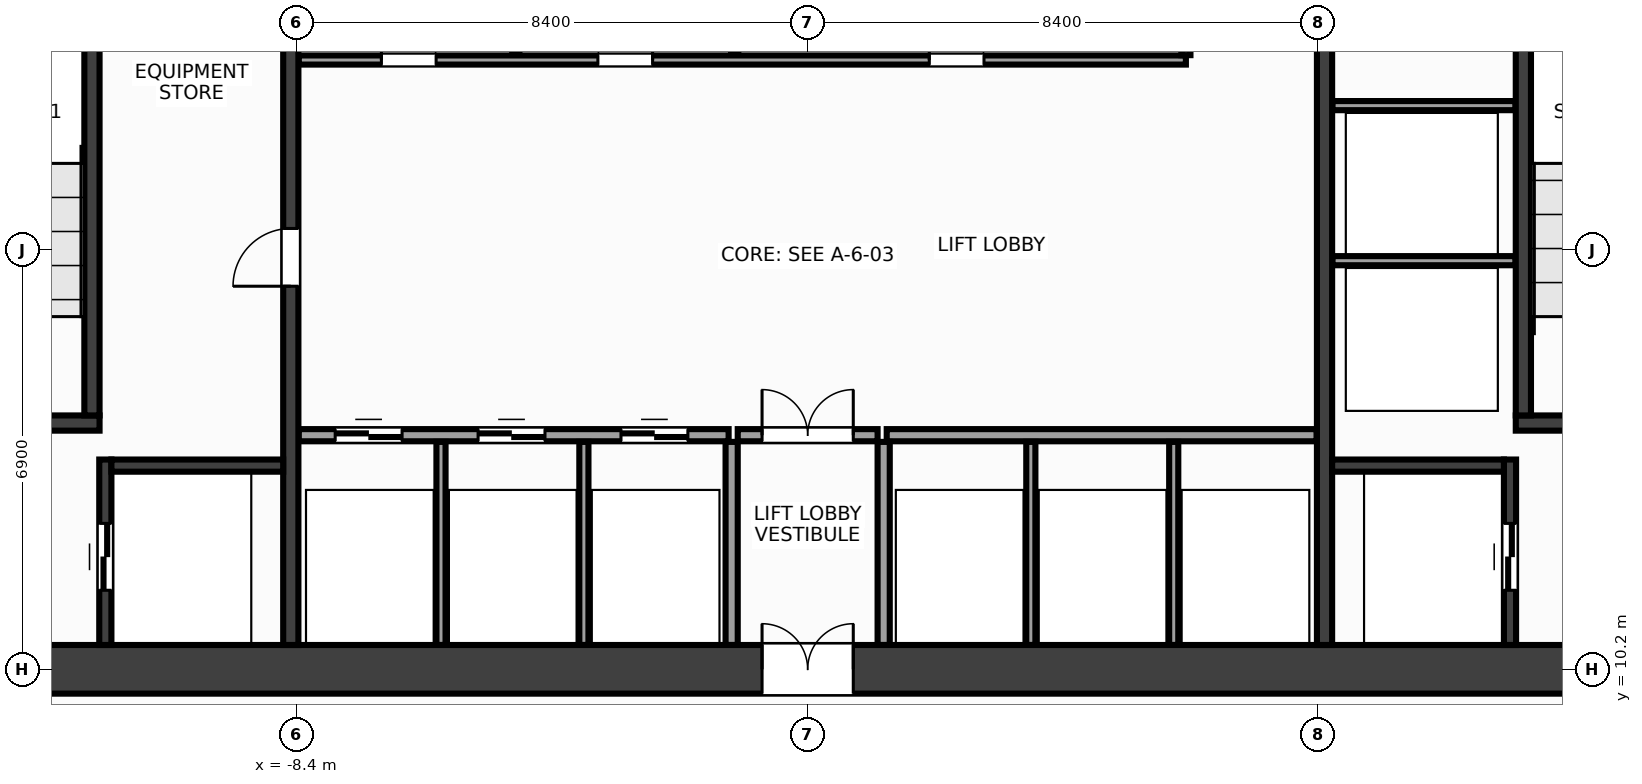
"""IFC4 building model, lengths in metres.
Left out: names, types, materials, properties, quantities, classifications, styles, units other than length and angle.
Written with IfcOpenShell. Run it as: python <this file> out.ifc"""

import sys

from ifc_helpers import new_model, si_unit, direction, frame, frame_2d, origin, place, context, subcontext, project, spatial, rectangle, extrude, source, transform, mapped, element, fill, save


model = new_model("IFC4")
c1 = context("Model", 3, precision=1e-05, world=origin(), true_north=direction((0.0, 1.0)))
c2 = subcontext(c1, "Body", "Model", "MODEL_VIEW")
j1 = project(units=[si_unit("LENGTHUNIT", "METRE"), si_unit("PLANEANGLEUNIT", "RADIAN")], contexts=[c1])
p1 = place(None, origin())
s1 = spatial("IfcSite", under=j1, at=p1, CompositionType="ELEMENT")
p2 = place(p1, origin())
s2 = spatial("IfcBuilding", under=s1, at=p2, CompositionType="ELEMENT")
p3 = place(p2, frame((0.0, 0.0, 30.8)))
s3 = spatial("IfcBuildingStorey", under=s2, at=p3, CompositionType="ELEMENT", Elevation=30.8)
m1 = source(origin(), c2, "Body", "SweptSolid", [
    extrude(rectangle(XDim=32.0, YDim=0.8, at=frame_2d((16.0, 0.0))), origin(), (0.0, 0.0, 1.0), 3.6),
])
p4 = place(p3, frame((-16.0, 10.2, 0.0), z_axis=(0.0, 0.0, 1.0), x_axis=(1.0, 0.0, 0.0)))
e1 = element("IfcWall", 1, at=p4, inside=s3, PredefinedType="SHEAR", context=c2, shape_type="MappedRepresentation", body=[
    mapped(m1, transform((0.0, 0.0, 0.0), x_axis=(1.0, 0.0, 0.0), y_axis=(0.0, 1.0, 0.0), z_axis=(0.0, 0.0, 1.0), scale=1.0)),
])
p5 = place(p4, frame((1.85, 0.0, 0.0)))
e2 = element("IfcOpeningElement", 2, at=p5, cuts=e1, PredefinedType="OPENING", context=c2, shape_type="SweptSolid", body=[
    extrude(rectangle(XDim=1.6, YDim=2.15, at=frame_2d((0.8, 1.075))), frame((0.0, 0.412, 0.0), z_axis=(0.0, -1.0, 0.0), x_axis=(1.0, 0.0, 0.0)), (0.0, 0.0, 1.0), 0.824),
])
p6 = place(p4, frame((28.55, 0.0, 0.0)))
e3 = element("IfcOpeningElement", 3, at=p6, cuts=e1, PredefinedType="OPENING", context=c2, shape_type="SweptSolid", body=[
    extrude(rectangle(XDim=1.6, YDim=2.15, at=frame_2d((0.8, 1.075))), frame((0.0, 0.412, 0.0), z_axis=(0.0, -1.0, 0.0), x_axis=(1.0, 0.0, 0.0)), (0.0, 0.0, 1.0), 0.824),
])
p7 = place(p4, frame((15.25, 0.0, 0.0)))
e4 = element("IfcOpeningElement", 4, at=p7, cuts=e1, PredefinedType="OPENING", context=c2, shape_type="SweptSolid", body=[
    extrude(rectangle(XDim=1.5, YDim=2.2, at=frame_2d((0.75, 1.1))), frame((0.0, 0.412, 0.0), z_axis=(0.0, -1.0, 0.0), x_axis=(1.0, 0.0, 0.0)), (0.0, 0.0, 1.0), 0.824),
])
m2 = source(origin(), c2, "Body", "SweptSolid", [
    extrude(rectangle(XDim=12.8, YDim=0.25, at=frame_2d((6.4, 0.0))), origin(), (0.0, 0.0, 1.0), 3.6),
])
p8 = place(p3, frame((-8.5, 10.6, 0.0), z_axis=(0.0, 0.0, 1.0), x_axis=(0.0, 1.0, 0.0)))
e5 = element("IfcWall", 5, at=p8, inside=s3, PredefinedType="SHEAR", context=c2, shape_type="MappedRepresentation", body=[
    mapped(m2, transform((0.0, 0.0, 0.0), x_axis=(1.0, 0.0, 0.0), y_axis=(0.0, 1.0, 0.0), z_axis=(0.0, 0.0, 1.0), scale=1.0)),
])
p9 = place(p8, frame((5.9, 0.0, 0.0)))
e6 = element("IfcOpeningElement", 6, at=p9, cuts=e5, PredefinedType="OPENING", context=c2, shape_type="SweptSolid", body=[
    extrude(rectangle(XDim=0.95, YDim=2.15, at=frame_2d((0.475, 1.075))), frame((0.0, 0.137, 0.0), z_axis=(0.0, -1.0, 0.0), x_axis=(1.0, 0.0, 0.0)), (0.0, 0.0, 1.0), 0.274),
])
p10 = place(p3, frame((8.5, 10.6, 0.0), z_axis=(0.0, 0.0, 1.0), x_axis=(0.0, 1.0, 0.0)))
e7 = element("IfcWall", 7, at=p10, inside=s3, PredefinedType="SHEAR", context=c2, shape_type="MappedRepresentation", body=[
    mapped(m2, transform((0.0, 0.0, 0.0), x_axis=(1.0, 0.0, 0.0), y_axis=(0.0, 1.0, 0.0), z_axis=(0.0, 0.0, 1.0), scale=1.0)),
])
p11 = place(p10, frame((9.85, 0.0, 0.0)))
e8 = element("IfcOpeningElement", 8, at=p11, cuts=e7, PredefinedType="OPENING", context=c2, shape_type="SweptSolid", body=[
    extrude(rectangle(XDim=0.95, YDim=2.15, at=frame_2d((0.475, 1.075))), frame((0.0, 0.137, 0.0), z_axis=(0.0, -1.0, 0.0), x_axis=(1.0, 0.0, 0.0)), (0.0, 0.0, 1.0), 0.274),
])
m3 = source(origin(), c2, "Body", "SweptSolid", [
    extrude(rectangle(XDim=3.555, YDim=0.25, at=frame_2d((1.777, 0.0))), origin(), (0.0, 0.0, 1.0), 3.6),
])
p12 = place(p3, frame((-15.2, 14.25, 0.0), z_axis=(0.0, 0.0, 1.0), x_axis=(1.0, 0.0, 0.0)))
e9 = element("IfcWall", 9, at=p12, inside=s3, PredefinedType="SHEAR", context=c2, shape_type="MappedRepresentation", body=[
    mapped(m3, transform((0.0, 0.0, 0.0), x_axis=(1.0, 0.0, 0.0), y_axis=(0.0, 1.0, 0.0), z_axis=(0.0, 0.0, 1.0), scale=1.0)),
])
p13 = place(p12, frame((0.95, 0.0, 0.0)))
e10 = element("IfcOpeningElement", 10, at=p13, cuts=e9, PredefinedType="OPENING", context=c2, shape_type="SweptSolid", body=[
    extrude(rectangle(XDim=1.6, YDim=2.15, at=frame_2d((0.8, 1.075))), frame((0.0, 0.137, 0.0), z_axis=(0.0, -1.0, 0.0), x_axis=(1.0, 0.0, 0.0)), (0.0, 0.0, 1.0), 0.274),
])
m4 = source(origin(), c2, "Body", "SweptSolid", [
    extrude(rectangle(XDim=9.025, YDim=0.25, at=frame_2d((4.512, 0.0))), origin(), (0.0, 0.0, 1.0), 3.6),
])
p14 = place(p3, frame((-11.77, 14.375, 0.0), z_axis=(0.0, 0.0, 1.0), x_axis=(0.0, 1.0, 0.0)))
e11 = element("IfcWall", 11, at=p14, inside=s3, PredefinedType="SHEAR", context=c2, shape_type="MappedRepresentation", body=[
    mapped(m4, transform((0.0, 0.0, 0.0), x_axis=(1.0, 0.0, 0.0), y_axis=(0.0, 1.0, 0.0), z_axis=(0.0, 0.0, 1.0), scale=1.0)),
])
p15 = place(p3, frame((11.645, 14.25, 0.0), z_axis=(0.0, 0.0, 1.0), x_axis=(1.0, 0.0, 0.0)))
e12 = element("IfcWall", 12, at=p15, inside=s3, PredefinedType="SHEAR", context=c2, shape_type="MappedRepresentation", body=[
    mapped(m3, transform((0.0, 0.0, 0.0), x_axis=(1.0, 0.0, 0.0), y_axis=(0.0, 1.0, 0.0), z_axis=(0.0, 0.0, 1.0), scale=1.0)),
])
p16 = place(p15, frame((0.95, 0.0, 0.0)))
e13 = element("IfcOpeningElement", 13, at=p16, cuts=e12, PredefinedType="OPENING", context=c2, shape_type="SweptSolid", body=[
    extrude(rectangle(XDim=1.6, YDim=2.15, at=frame_2d((0.8, 1.075))), frame((0.0, 0.137, 0.0), z_axis=(0.0, -1.0, 0.0), x_axis=(1.0, 0.0, 0.0)), (0.0, 0.0, 1.0), 0.274),
])
p17 = place(p3, frame((11.77, 14.375, 0.0), z_axis=(0.0, 0.0, 1.0), x_axis=(0.0, 1.0, 0.0)))
e14 = element("IfcWall", 14, at=p17, inside=s3, PredefinedType="SHEAR", context=c2, shape_type="MappedRepresentation", body=[
    mapped(m4, transform((0.0, 0.0, 0.0), x_axis=(1.0, 0.0, 0.0), y_axis=(0.0, 1.0, 0.0), z_axis=(0.0, 0.0, 1.0), scale=1.0)),
])
m5 = source(origin(), c2, "Body", "SweptSolid", [
    extrude(rectangle(XDim=3.05, YDim=0.2, at=frame_2d((1.525, 0.0))), origin(), (0.0, 0.0, 1.0), 3.6),
])
p18 = place(p3, frame((-11.55, 10.6, 0.0), z_axis=(0.0, 0.0, 1.0), x_axis=(0.0, 1.0, 0.0)))
e15 = element("IfcWall", 15, at=p18, inside=s3, PredefinedType="SHEAR", context=c2, shape_type="MappedRepresentation", body=[
    mapped(m5, transform((0.0, 0.0, 0.0), x_axis=(1.0, 0.0, 0.0), y_axis=(0.0, 1.0, 0.0), z_axis=(0.0, 0.0, 1.0), scale=1.0)),
])
p19 = place(p18, frame((0.9, 0.0, 0.0)))
e16 = element("IfcOpeningElement", 16, at=p19, cuts=e15, PredefinedType="OPENING", context=c2, shape_type="SweptSolid", body=[
    extrude(rectangle(XDim=1.1, YDim=2.15, at=frame_2d((0.55, 1.075))), frame((0.0, 0.112, 0.0), z_axis=(0.0, -1.0, 0.0), x_axis=(1.0, 0.0, 0.0)), (0.0, 0.0, 1.0), 0.224),
])
m6 = source(origin(), c2, "Body", "SweptSolid", [
    extrude(rectangle(XDim=2.825, YDim=0.2, at=frame_2d((1.413, 0.0))), origin(), (0.0, 0.0, 1.0), 3.6),
])
p20 = place(p3, frame((-11.45, 13.55, 0.0), z_axis=(0.0, 0.0, 1.0), x_axis=(1.0, 0.0, 0.0)))
e17 = element("IfcWall", 17, at=p20, inside=s3, PredefinedType="SHEAR", context=c2, shape_type="MappedRepresentation", body=[
    mapped(m6, transform((0.0, 0.0, 0.0), x_axis=(1.0, 0.0, 0.0), y_axis=(0.0, 1.0, 0.0), z_axis=(0.0, 0.0, 1.0), scale=1.0)),
])
p21 = place(p3, frame((11.55, 10.6, 0.0), z_axis=(0.0, 0.0, 1.0), x_axis=(0.0, 1.0, 0.0)))
e18 = element("IfcWall", 18, at=p21, inside=s3, PredefinedType="SHEAR", context=c2, shape_type="MappedRepresentation", body=[
    mapped(m5, transform((0.0, 0.0, 0.0), x_axis=(1.0, 0.0, 0.0), y_axis=(0.0, 1.0, 0.0), z_axis=(0.0, 0.0, 1.0), scale=1.0)),
])
p22 = place(p21, frame((0.9, 0.0, 0.0)))
e19 = element("IfcOpeningElement", 19, at=p22, cuts=e18, PredefinedType="OPENING", context=c2, shape_type="SweptSolid", body=[
    extrude(rectangle(XDim=1.1, YDim=2.15, at=frame_2d((0.55, 1.075))), frame((0.0, 0.112, 0.0), z_axis=(0.0, -1.0, 0.0), x_axis=(1.0, 0.0, 0.0)), (0.0, 0.0, 1.0), 0.224),
])
p23 = place(p3, frame((8.625, 13.55, 0.0), z_axis=(0.0, 0.0, 1.0), x_axis=(1.0, 0.0, 0.0)))
e20 = element("IfcWall", 20, at=p23, inside=s3, PredefinedType="SHEAR", context=c2, shape_type="MappedRepresentation", body=[
    mapped(m6, transform((0.0, 0.0, 0.0), x_axis=(1.0, 0.0, 0.0), y_axis=(0.0, 1.0, 0.0), z_axis=(0.0, 0.0, 1.0), scale=1.0)),
])
m7 = source(origin(), c2, "Body", "SweptSolid", [
    extrude(rectangle(XDim=3.01, YDim=0.15, at=frame_2d((1.505, 0.0))), origin(), (0.0, 0.0, 1.0), 3.36),
])
for number, where, z_axis, x_axis in (
    (21, (8.63, 16.92, 0.0), (0.0, 0.0, 1.0), (1.0, 0.0, 0.0)),
    (22, (8.63, 19.47, 0.0), (0.0, 0.0, 1.0), (1.0, 0.0, 0.0)),
):
    element("IfcWall", number, at=place(p3, frame(where, z_axis=z_axis, x_axis=x_axis)), inside=s3, PredefinedType="PARTITIONING", context=c2, shape_type="MappedRepresentation", body=[
        mapped(m7, transform((0.0, 0.0, 0.0), x_axis=(1.0, 0.0, 0.0), y_axis=(0.0, 1.0, 0.0), z_axis=(0.0, 0.0, 1.0), scale=1.0)),
    ])
m8 = source(origin(), c2, "Body", "SweptSolid", [
    extrude(rectangle(XDim=7.07, YDim=0.2, at=frame_2d((3.535, 0.0))), origin(), (0.0, 0.0, 1.0), 3.36),
])
p24 = place(p3, frame((-8.37, 14.05, 0.0), z_axis=(0.0, 0.0, 1.0), x_axis=(1.0, 0.0, 0.0)))
e23 = element("IfcWall", 23, at=p24, inside=s3, PredefinedType="PARTITIONING", context=c2, shape_type="MappedRepresentation", body=[
    mapped(m8, transform((0.0, 0.0, 0.0), x_axis=(1.0, 0.0, 0.0), y_axis=(0.0, 1.0, 0.0), z_axis=(0.0, 0.0, 1.0), scale=1.0)),
])
p25 = place(p24, frame((0.6, 0.0, 0.0)))
e24 = element("IfcOpeningElement", 24, at=p25, cuts=e23, PredefinedType="OPENING", context=c2, shape_type="SweptSolid", body=[
    extrude(rectangle(XDim=1.1, YDim=2.15, at=frame_2d((0.55, 1.075))), frame((0.0, 0.112, 0.0), z_axis=(0.0, -1.0, 0.0), x_axis=(1.0, 0.0, 0.0)), (0.0, 0.0, 1.0), 0.224),
])
p26 = place(p24, frame((2.95, 0.0, 0.0)))
e25 = element("IfcOpeningElement", 25, at=p26, cuts=e23, PredefinedType="OPENING", context=c2, shape_type="SweptSolid", body=[
    extrude(rectangle(XDim=1.1, YDim=2.15, at=frame_2d((0.55, 1.075))), frame((0.0, 0.112, 0.0), z_axis=(0.0, -1.0, 0.0), x_axis=(1.0, 0.0, 0.0)), (0.0, 0.0, 1.0), 0.224),
])
p27 = place(p24, frame((5.3, 0.0, 0.0)))
e26 = element("IfcOpeningElement", 26, at=p27, cuts=e23, PredefinedType="OPENING", context=c2, shape_type="SweptSolid", body=[
    extrude(rectangle(XDim=1.1, YDim=2.15, at=frame_2d((0.55, 1.075))), frame((0.0, 0.112, 0.0), z_axis=(0.0, -1.0, 0.0), x_axis=(1.0, 0.0, 0.0)), (0.0, 0.0, 1.0), 0.224),
])
p28 = place(p3, frame((1.3, 14.05, 0.0), z_axis=(0.0, 0.0, 1.0), x_axis=(1.0, 0.0, 0.0)))
e27 = element("IfcWall", 27, at=p28, inside=s3, PredefinedType="PARTITIONING", context=c2, shape_type="MappedRepresentation", body=[
    mapped(m8, transform((0.0, 0.0, 0.0), x_axis=(1.0, 0.0, 0.0), y_axis=(0.0, 1.0, 0.0), z_axis=(0.0, 0.0, 1.0), scale=1.0)),
])
m9 = source(origin(), c2, "Body", "SweptSolid", [
    extrude(rectangle(XDim=3.34, YDim=0.2, at=frame_2d((1.67, 0.0))), origin(), (0.0, 0.0, 1.0), 3.36),
])
for number, where, z_axis, x_axis in (
    (28, (-1.25, 10.6, 0.0), (0.0, 0.0, 1.0), (0.0, 1.0, 0.0)),
    (29, (1.25, 10.6, 0.0), (0.0, 0.0, 1.0), (0.0, 1.0, 0.0)),
):
    element("IfcWall", number, at=place(p3, frame(where, z_axis=z_axis, x_axis=x_axis)), inside=s3, PredefinedType="PARTITIONING", context=c2, shape_type="MappedRepresentation", body=[
        mapped(m9, transform((0.0, 0.0, 0.0), x_axis=(1.0, 0.0, 0.0), y_axis=(0.0, 1.0, 0.0), z_axis=(0.0, 0.0, 1.0), scale=1.0)),
    ])
m10 = source(origin(), c2, "Body", "SweptSolid", [
    extrude(rectangle(XDim=2.3, YDim=0.2, at=frame_2d((1.15, 0.0))), origin(), (0.0, 0.0, 1.0), 3.36),
])
p29 = place(p3, frame((-1.15, 14.05, 0.0), z_axis=(0.0, 0.0, 1.0), x_axis=(1.0, 0.0, 0.0)))
e30 = element("IfcWall", 30, at=p29, inside=s3, PredefinedType="PARTITIONING", context=c2, shape_type="MappedRepresentation", body=[
    mapped(m10, transform((0.0, 0.0, 0.0), x_axis=(1.0, 0.0, 0.0), y_axis=(0.0, 1.0, 0.0), z_axis=(0.0, 0.0, 1.0), scale=1.0)),
])
p30 = place(p29, frame((0.4, 0.0, 0.0)))
e31 = element("IfcOpeningElement", 31, at=p30, cuts=e30, PredefinedType="OPENING", context=c2, shape_type="SweptSolid", body=[
    extrude(rectangle(XDim=1.5, YDim=2.2, at=frame_2d((0.75, 1.1))), frame((0.0, 0.112, 0.0), z_axis=(0.0, -1.0, 0.0), x_axis=(1.0, 0.0, 0.0)), (0.0, 0.0, 1.0), 0.224),
])
m11 = source(origin(), c2, "Body", "SweptSolid", [
    extrude(rectangle(XDim=14.59, YDim=0.15, at=frame_2d((7.295, 0.0))), origin(), (0.0, 0.0, 1.0), 3.36),
])
p31 = place(p3, frame((-8.37, 20.22, 0.0), z_axis=(0.0, 0.0, 1.0), x_axis=(1.0, 0.0, 0.0)))
e32 = element("IfcWall", 32, at=p31, inside=s3, PredefinedType="PARTITIONING", context=c2, shape_type="MappedRepresentation", body=[
    mapped(m11, transform((0.0, 0.0, 0.0), x_axis=(1.0, 0.0, 0.0), y_axis=(0.0, 1.0, 0.0), z_axis=(0.0, 0.0, 1.0), scale=1.0)),
])
p32 = place(p31, frame((1.36, 0.0, 0.0)))
e33 = element("IfcOpeningElement", 33, at=p32, cuts=e32, PredefinedType="OPENING", context=c2, shape_type="SweptSolid", body=[
    extrude(rectangle(XDim=0.9, YDim=2.15, at=frame_2d((0.45, 1.075))), frame((0.0, 0.087, 0.0), z_axis=(0.0, -1.0, 0.0), x_axis=(1.0, 0.0, 0.0)), (0.0, 0.0, 1.0), 0.174),
])
p33 = place(p31, frame((4.92, 0.0, 0.0)))
e34 = element("IfcOpeningElement", 34, at=p33, cuts=e32, PredefinedType="OPENING", context=c2, shape_type="SweptSolid", body=[
    extrude(rectangle(XDim=0.9, YDim=2.15, at=frame_2d((0.45, 1.075))), frame((0.0, 0.087, 0.0), z_axis=(0.0, -1.0, 0.0), x_axis=(1.0, 0.0, 0.0)), (0.0, 0.0, 1.0), 0.174),
])
p34 = place(p31, frame((10.37, 0.0, 0.0)))
e35 = element("IfcOpeningElement", 35, at=p34, cuts=e32, PredefinedType="OPENING", context=c2, shape_type="SweptSolid", body=[
    extrude(rectangle(XDim=0.9, YDim=2.15, at=frame_2d((0.45, 1.075))), frame((0.0, 0.087, 0.0), z_axis=(0.0, -1.0, 0.0), x_axis=(1.0, 0.0, 0.0)), (0.0, 0.0, 1.0), 0.174),
])
m12 = source(origin(), c2, "Body", "SweptSolid", [
    extrude(rectangle(XDim=1.55, YDim=0.15, at=frame_2d((0.775, 0.0))), origin(), (0.0, 0.0, 1.0), 3.36),
])
p35 = place(p3, frame((6.22, 20.3, 0.0), z_axis=(0.0, 0.0, 1.0), x_axis=(0.0, 1.0, 0.0)))
e36 = element("IfcWall", 36, at=p35, inside=s3, PredefinedType="PARTITIONING", context=c2, shape_type="MappedRepresentation", body=[
    mapped(m12, transform((0.0, 0.0, 0.0), x_axis=(1.0, 0.0, 0.0), y_axis=(0.0, 1.0, 0.0), z_axis=(0.0, 0.0, 1.0), scale=1.0)),
])
m13 = source(origin(), c2, "Body", "SweptSolid", [
    extrude(rectangle(XDim=3.34, YDim=0.15, at=frame_2d((1.67, 0.0))), origin(), (0.0, 0.0, 1.0), 3.36),
])
for number, where, z_axis, x_axis in (
    (37, (-6.03, 10.6, 0.0), (0.0, 0.0, 1.0), (0.0, 1.0, 0.0)),
    (38, (-3.68, 10.6, 0.0), (0.0, 0.0, 1.0), (0.0, 1.0, 0.0)),
    (39, (3.67, 10.6, 0.0), (0.0, 0.0, 1.0), (0.0, 1.0, 0.0)),
    (40, (6.02, 10.6, 0.0), (0.0, 0.0, 1.0), (0.0, 1.0, 0.0)),
):
    element("IfcWall", number, at=place(p3, frame(where, z_axis=z_axis, x_axis=x_axis)), inside=s3, PredefinedType="PARTITIONING", context=c2, shape_type="MappedRepresentation", body=[
        mapped(m13, transform((0.0, 0.0, 0.0), x_axis=(1.0, 0.0, 0.0), y_axis=(0.0, 1.0, 0.0), z_axis=(0.0, 0.0, 1.0), scale=1.0)),
    ])
m14 = source(origin(), c2, "Body", "SweptSolid", [
    extrude(rectangle(XDim=3.04, YDim=0.12, at=frame_2d((1.52, 0.0))), origin(), (0.0, 0.0, 1.0), 3.36),
])
for number, where, z_axis, x_axis in (
    (41, (-4.8, 20.32, 0.0), (0.0, 0.0, 1.0), (0.0, 1.0, 0.0)),
    (42, (-1.2, 20.32, 0.0), (0.0, 0.0, 1.0), (0.0, 1.0, 0.0)),
):
    element("IfcWall", number, at=place(p3, frame(where, z_axis=z_axis, x_axis=x_axis)), inside=s3, PredefinedType="PARTITIONING", context=c2, shape_type="MappedRepresentation", body=[
        mapped(m14, transform((0.0, 0.0, 0.0), x_axis=(1.0, 0.0, 0.0), y_axis=(0.0, 1.0, 0.0), z_axis=(0.0, 0.0, 1.0), scale=1.0)),
    ])
m15 = source(origin(), c2, "Body", "SweptSolid", [
    extrude(rectangle(XDim=1.1, YDim=2.15, at=frame_2d((0.55, 1.075))), frame((0.0, 0.025, 0.0), z_axis=(0.0, -1.0, 0.0), x_axis=(1.0, 0.0, 0.0)), (0.0, 0.0, 1.0), 0.05),
])
p36 = place(p19, origin())
e43 = element("IfcDoor", 43, at=p36, inside=s3, OperationType="DOUBLE_DOOR_SLIDING", PredefinedType="DOOR", context=c2, shape_type="MappedRepresentation", body=[
    mapped(m15, transform((0.0, 0.0, 0.0), x_axis=(1.0, 0.0, 0.0), y_axis=(0.0, 1.0, 0.0), z_axis=(0.0, 0.0, 1.0), scale=1.0)),
])
fill(e16, e43)
p37 = place(p22, origin())
e44 = element("IfcDoor", 44, at=p37, inside=s3, OperationType="DOUBLE_DOOR_SLIDING", PredefinedType="DOOR", context=c2, shape_type="MappedRepresentation", body=[
    mapped(m15, transform((0.0, 0.0, 0.0), x_axis=(1.0, 0.0, 0.0), y_axis=(0.0, 1.0, 0.0), z_axis=(0.0, 0.0, 1.0), scale=1.0)),
])
fill(e19, e44)
m16 = source(origin(), c2, "Body", "SweptSolid", [
    extrude(rectangle(XDim=0.95, YDim=2.15, at=frame_2d((0.475, 1.075))), frame((0.0, 0.025, 0.0), z_axis=(0.0, -1.0, 0.0), x_axis=(1.0, 0.0, 0.0)), (0.0, 0.0, 1.0), 0.05),
])
p38 = place(p9, origin())
e45 = element("IfcDoor", 45, at=p38, inside=s3, OperationType="SINGLE_SWING_LEFT", PredefinedType="DOOR", context=c2, shape_type="MappedRepresentation", body=[
    mapped(m16, transform((0.0, 0.0, 0.0), x_axis=(1.0, 0.0, 0.0), y_axis=(0.0, 1.0, 0.0), z_axis=(0.0, 0.0, 1.0), scale=1.0)),
])
fill(e6, e45)
p39 = place(p25, origin())
e46 = element("IfcDoor", 46, at=p39, inside=s3, OperationType="DOUBLE_DOOR_SLIDING", PredefinedType="DOOR", context=c2, shape_type="MappedRepresentation", body=[
    mapped(m15, transform((0.0, 0.0, 0.0), x_axis=(1.0, 0.0, 0.0), y_axis=(0.0, 1.0, 0.0), z_axis=(0.0, 0.0, 1.0), scale=1.0)),
])
fill(e24, e46)
p40 = place(p26, origin())
e47 = element("IfcDoor", 47, at=p40, inside=s3, OperationType="DOUBLE_DOOR_SLIDING", PredefinedType="DOOR", context=c2, shape_type="MappedRepresentation", body=[
    mapped(m15, transform((0.0, 0.0, 0.0), x_axis=(1.0, 0.0, 0.0), y_axis=(0.0, 1.0, 0.0), z_axis=(0.0, 0.0, 1.0), scale=1.0)),
])
fill(e25, e47)
p41 = place(p27, origin())
e48 = element("IfcDoor", 48, at=p41, inside=s3, OperationType="DOUBLE_DOOR_SLIDING", PredefinedType="DOOR", context=c2, shape_type="MappedRepresentation", body=[
    mapped(m15, transform((0.0, 0.0, 0.0), x_axis=(1.0, 0.0, 0.0), y_axis=(0.0, 1.0, 0.0), z_axis=(0.0, 0.0, 1.0), scale=1.0)),
])
fill(e26, e48)
m17 = source(origin(), c2, "Body", "SweptSolid", [
    extrude(rectangle(XDim=1.5, YDim=2.2, at=frame_2d((0.75, 1.1))), frame((0.0, 0.025, 0.0), z_axis=(0.0, -1.0, 0.0), x_axis=(1.0, 0.0, 0.0)), (0.0, 0.0, 1.0), 0.05),
])
p42 = place(p30, origin())
e49 = element("IfcDoor", 49, at=p42, inside=s3, OperationType="DOUBLE_DOOR_SINGLE_SWING", PredefinedType="DOOR", context=c2, shape_type="MappedRepresentation", body=[
    mapped(m17, transform((0.0, 0.0, 0.0), x_axis=(1.0, 0.0, 0.0), y_axis=(0.0, 1.0, 0.0), z_axis=(0.0, 0.0, 1.0), scale=1.0)),
])
fill(e31, e49)
p43 = place(p7, origin())
e50 = element("IfcDoor", 50, at=p43, inside=s3, OperationType="DOUBLE_DOOR_SINGLE_SWING", PredefinedType="DOOR", context=c2, shape_type="MappedRepresentation", body=[
    mapped(m17, transform((0.0, 0.0, 0.0), x_axis=(1.0, 0.0, 0.0), y_axis=(0.0, 1.0, 0.0), z_axis=(0.0, 0.0, 1.0), scale=1.0)),
])
fill(e4, e50)
m18 = source(origin(), c2, "Body", "SweptSolid", [
    extrude(rectangle(XDim=0.9, YDim=2.15, at=frame_2d((0.45, 1.075))), frame((0.0, 0.025, 0.0), z_axis=(0.0, -1.0, 0.0), x_axis=(1.0, 0.0, 0.0)), (0.0, 0.0, 1.0), 0.05),
])
p44 = place(p32, origin())
e51 = element("IfcDoor", 51, at=p44, inside=s3, OperationType="SINGLE_SWING_LEFT", PredefinedType="DOOR", context=c2, shape_type="MappedRepresentation", body=[
    mapped(m18, transform((0.0, 0.0, 0.0), x_axis=(1.0, 0.0, 0.0), y_axis=(0.0, 1.0, 0.0), z_axis=(0.0, 0.0, 1.0), scale=1.0)),
])
fill(e33, e51)
p45 = place(p33, origin())
e52 = element("IfcDoor", 52, at=p45, inside=s3, OperationType="SINGLE_SWING_RIGHT", PredefinedType="DOOR", context=c2, shape_type="MappedRepresentation", body=[
    mapped(m18, transform((0.0, 0.0, 0.0), x_axis=(1.0, 0.0, 0.0), y_axis=(0.0, 1.0, 0.0), z_axis=(0.0, 0.0, 1.0), scale=1.0)),
])
fill(e34, e52)
p46 = place(p34, origin())
e53 = element("IfcDoor", 53, at=p46, inside=s3, OperationType="SINGLE_SWING_LEFT", PredefinedType="DOOR", context=c2, shape_type="MappedRepresentation", body=[
    mapped(m18, transform((0.0, 0.0, 0.0), x_axis=(1.0, 0.0, 0.0), y_axis=(0.0, 1.0, 0.0), z_axis=(0.0, 0.0, 1.0), scale=1.0)),
])
fill(e35, e53)
save(model, sys.argv[1])
